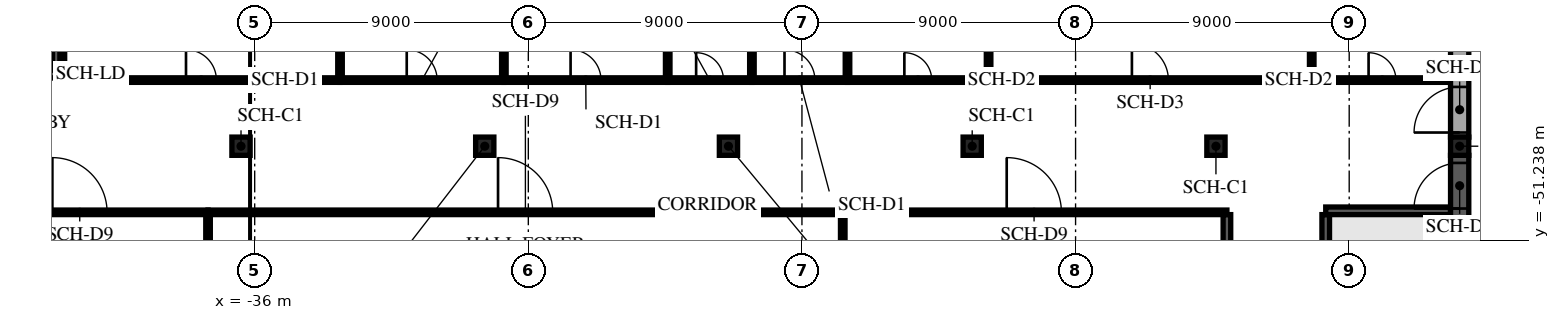
"""IFC4 building model, lengths in metres.
Left out: names, types, materials, properties, quantities, classifications, styles, units other than length and angle.
Written with IfcOpenShell. Run it as: python <this file> out.ifc"""

import sys

from ifc_helpers import new_model, si_unit, direction, frame, frame_2d, origin, origin_2d, place, context, subcontext, project, spatial, rectangle, extrude, element, fill, save


model = new_model("IFC4")
c1 = context("Model", 3, precision=1e-05, world=origin(), true_north=direction((0.0, 1.0)))
c2 = subcontext(c1, "Body", "Model", "MODEL_VIEW")
j1 = project(units=[si_unit("LENGTHUNIT", "METRE"), si_unit("PLANEANGLEUNIT", "RADIAN")], contexts=[c1])
p1 = place(None, origin())
s1 = spatial("IfcSite", under=j1, at=p1, CompositionType="ELEMENT")
p2 = place(p1, origin())
s2 = spatial("IfcBuilding", under=s1, at=p2, CompositionType="ELEMENT")
p3 = place(p2, origin())
s3 = spatial("IfcBuildingStorey", under=s2, at=p3, CompositionType="ELEMENT", Elevation=0.0)
p4 = place(p3, frame((-42.525, -45.9, -1.5), z_axis=(0.0, 0.0, 1.0), x_axis=(0.0, 1.0, 0.0)))
e1 = element("IfcWall", 1, at=p4, inside=s3, PredefinedType="SHEAR", context=c2, shape_type="SweptSolid", body=[
    extrude(rectangle(XDim=3.6, YDim=0.25, at=frame_2d((1.8, 0.0))), origin(), (0.0, 0.0, 1.0), 6.0),
])
p5 = place(p3, frame((-45.9, -45.775, -1.5), z_axis=(0.0, 0.0, 1.0), x_axis=(1.0, 0.0, 0.0)))
e2 = element("IfcWall", 2, at=p5, inside=s3, PredefinedType="SHEAR", context=c2, shape_type="SweptSolid", body=[
    extrude(rectangle(XDim=3.5, YDim=0.25, at=frame_2d((1.75, 0.0))), origin(), (0.0, 0.0, 1.0), 6.0),
])
p6 = place(p5, frame((1.2, 0.0, 1.5)))
e3 = element("IfcOpeningElement", 3, at=p6, cuts=e2, PredefinedType="OPENING", context=c2, shape_type="SweptSolid", body=[
    extrude(rectangle(XDim=1.1, YDim=2.1, at=frame_2d((0.55, 1.05))), frame((0.0, 0.135, 0.0), z_axis=(0.0, -1.0, 0.0), x_axis=(1.0, 0.0, 0.0)), (0.0, 0.0, 1.0), 0.27),
])
for number, where, z_axis, x_axis in (
    (4, (-36.45, -48.15, -0.2), (0.0, 0.0, 1.0), (1.0, 0.0, 0.0)),
    (5, (-28.433, -48.15, -0.2), (0.0, 0.0, 1.0), (1.0, 0.0, 0.0)),
    (6, (-20.417, -48.15, -0.2), (0.0, 0.0, 1.0), (1.0, 0.0, 0.0)),
    (7, (-12.4, -48.15, -0.2), (0.0, 0.0, 1.0), (1.0, 0.0, 0.0)),
    (8, (-4.383, -48.15, -0.2), (0.0, 0.0, 1.0), (1.0, 0.0, 0.0)),
    (9, (3.633, -48.15, -0.2), (0.0, 0.0, 1.0), (1.0, 0.0, 0.0)),
):
    element("IfcColumn", number, at=place(p3, frame(where, z_axis=z_axis, x_axis=x_axis)), inside=s3, PredefinedType="COLUMN", context=c2, shape_type="SweptSolid", body=[
        extrude(rectangle(XDim=0.6, YDim=0.6, at=origin_2d()), origin(), (0.0, 0.0, 1.0), 4.7),
    ])
for number, where, z_axis, x_axis in (
    (10, (-37.534, -59.55, 0.0), (0.0, 0.0, 1.0), (0.0, 1.0, 0.0)),
    (11, (-16.658, -59.55, 0.0), (0.0, 0.0, 1.0), (0.0, 1.0, 0.0)),
):
    element("IfcWall", number, at=place(p3, frame(where, z_axis=z_axis, x_axis=x_axis)), inside=s3, PredefinedType="PARTITIONING", context=c2, shape_type="SweptSolid", body=[
        extrude(rectangle(XDim=9.15, YDim=0.15, at=frame_2d((4.575, 0.0))), origin(), (0.0, 0.0, 1.0), 4.1),
    ])
p7 = place(p3, frame((-4.022, -59.55, 0.0), z_axis=(0.0, 0.0, 1.0), x_axis=(0.0, 1.0, 0.0)))
e12 = element("IfcWall", 12, at=p7, inside=s3, PredefinedType="SHEAR", context=c2, shape_type="SweptSolid", body=[
    extrude(rectangle(XDim=9.15, YDim=0.25, at=frame_2d((4.575, 0.0))), origin(), (0.0, 0.0, 1.0), 4.1),
])
p8 = place(p3, frame((-0.772, -59.55, 0.0), z_axis=(0.0, 0.0, 1.0), x_axis=(0.0, 1.0, 0.0)))
e13 = element("IfcWall", 13, at=p8, inside=s3, PredefinedType="SHEAR", context=c2, shape_type="SweptSolid", body=[
    extrude(rectangle(XDim=9.15, YDim=0.25, at=frame_2d((4.575, 0.0))), origin(), (0.0, 0.0, 1.0), 4.1),
])
p9 = place(p8, frame((0.35, 0.0, 0.0)))
e14 = element("IfcOpeningElement", 14, at=p9, cuts=e13, PredefinedType="OPENING", context=c2, shape_type="SweptSolid", body=[
    extrude(rectangle(XDim=1.2, YDim=2.1, at=frame_2d((0.6, 1.05))), frame((0.0, 0.135, 0.0), z_axis=(0.0, -1.0, 0.0), x_axis=(1.0, 0.0, 0.0)), (0.0, 0.0, 1.0), 0.27),
])
p10 = place(p3, frame((-45.9, -50.325, 0.0), z_axis=(0.0, 0.0, 1.0), x_axis=(1.0, 0.0, 0.0)))
e15 = element("IfcWall", 15, at=p10, inside=s3, PredefinedType="PARTITIONING", context=c2, shape_type="SweptSolid", body=[
    extrude(rectangle(XDim=8.365, YDim=0.15, at=frame_2d((4.183, 0.0))), origin(), (0.0, 0.0, 1.0), 4.1),
])
p11 = place(p10, frame((3.245, 0.0, 0.0)))
e16 = element("IfcOpeningElement", 16, at=p11, cuts=e15, PredefinedType="OPENING", context=c2, shape_type="SweptSolid", body=[
    extrude(rectangle(XDim=1.8, YDim=2.4, at=frame_2d((0.9, 1.2))), frame((0.0, 0.085, 0.0), z_axis=(0.0, -1.0, 0.0), x_axis=(1.0, 0.0, 0.0)), (0.0, 0.0, 1.0), 0.17),
])
p12 = place(p3, frame((-37.534, -50.325, 0.0), z_axis=(0.0, 0.0, 1.0), x_axis=(1.0, 0.0, 0.0)))
e17 = element("IfcWall", 17, at=p12, inside=s3, PredefinedType="PARTITIONING", context=c2, shape_type="SweptSolid", body=[
    extrude(rectangle(XDim=20.876, YDim=0.15, at=frame_2d((10.438, 0.0))), origin(), (0.0, 0.0, 1.0), 4.1),
])
p13 = place(p12, frame((9.538, 0.0, 0.0)))
e18 = element("IfcOpeningElement", 18, at=p13, cuts=e17, PredefinedType="OPENING", context=c2, shape_type="SweptSolid", body=[
    extrude(rectangle(XDim=1.8, YDim=2.4, at=frame_2d((0.9, 1.2))), frame((0.0, 0.085, 0.0), z_axis=(0.0, -1.0, 0.0), x_axis=(1.0, 0.0, 0.0)), (0.0, 0.0, 1.0), 0.17),
])
p14 = place(p3, frame((-16.658, -50.325, 0.0), z_axis=(0.0, 0.0, 1.0), x_axis=(1.0, 0.0, 0.0)))
e19 = element("IfcWall", 19, at=p14, inside=s3, PredefinedType="PARTITIONING", context=c2, shape_type="SweptSolid", body=[
    extrude(rectangle(XDim=12.636, YDim=0.15, at=frame_2d((6.318, 0.0))), origin(), (0.0, 0.0, 1.0), 4.1),
])
p15 = place(p14, frame((5.393, 0.0, 0.0)))
e20 = element("IfcOpeningElement", 20, at=p15, cuts=e19, PredefinedType="OPENING", context=c2, shape_type="SweptSolid", body=[
    extrude(rectangle(XDim=1.8, YDim=2.4, at=frame_2d((0.9, 1.2))), frame((0.0, 0.085, 0.0), z_axis=(0.0, -1.0, 0.0), x_axis=(1.0, 0.0, 0.0)), (0.0, 0.0, 1.0), 0.17),
])
p16 = place(p3, frame((-0.772, -50.275, 0.0), z_axis=(0.0, 0.0, 1.0), x_axis=(1.0, 0.0, 0.0)))
e21 = element("IfcWall", 21, at=p16, inside=s3, PredefinedType="SHEAR", context=c2, shape_type="SweptSolid", body=[
    extrude(rectangle(XDim=4.105, YDim=0.25, at=frame_2d((2.052, 0.0))), origin(), (0.0, 0.0, 1.0), 4.1),
])
for number, where, z_axis, x_axis in (
    (22, (-33.194, -45.9, 0.0), (0.0, 0.0, 1.0), (0.0, 1.0, 0.0)),
    (23, (-27.804, -45.9, 0.0), (0.0, 0.0, 1.0), (0.0, 1.0, 0.0)),
    (24, (-22.415, -45.9, 0.0), (0.0, 0.0, 1.0), (0.0, 1.0, 0.0)),
    (25, (-19.646, -45.9, 0.0), (0.0, 0.0, 1.0), (0.0, 1.0, 0.0)),
    (26, (-16.502, -45.9, 0.0), (0.0, 0.0, 1.0), (0.0, 1.0, 0.0)),
    (27, (-11.861, -45.9, 0.0), (0.0, 0.0, 1.0), (0.0, 1.0, 0.0)),
    (28, (-1.233, -45.9, 0.0), (0.0, 0.0, 1.0), (0.0, 1.0, 0.0)),
):
    element("IfcWall", number, at=place(p3, frame(where, z_axis=z_axis, x_axis=x_axis)), inside=s3, PredefinedType="PARTITIONING", context=c2, shape_type="SweptSolid", body=[
        extrude(rectangle(XDim=9.15, YDim=0.15, at=frame_2d((4.575, 0.0))), origin(), (0.0, 0.0, 1.0), 4.1),
    ])
p17 = place(p3, frame((-42.25, -45.975, 0.0), z_axis=(0.0, 0.0, 1.0), x_axis=(1.0, 0.0, 0.0)))
e29 = element("IfcWall", 29, at=p17, inside=s3, PredefinedType="PARTITIONING", context=c2, shape_type="SweptSolid", body=[
    extrude(rectangle(XDim=9.056, YDim=0.15, at=frame_2d((4.528, 0.0))), origin(), (0.0, 0.0, 1.0), 4.1),
])
p18 = place(p17, frame((3.991, 0.0, 0.0)))
e30 = element("IfcOpeningElement", 30, at=p18, cuts=e29, PredefinedType="OPENING", context=c2, shape_type="SweptSolid", body=[
    extrude(rectangle(XDim=1.0, YDim=2.1, at=frame_2d((0.5, 1.05))), frame((0.0, 0.085, 0.0), z_axis=(0.0, -1.0, 0.0), x_axis=(1.0, 0.0, 0.0)), (0.0, 0.0, 1.0), 0.17),
])
p19 = place(p3, frame((-33.194, -45.975, 0.0), z_axis=(0.0, 0.0, 1.0), x_axis=(1.0, 0.0, 0.0)))
e31 = element("IfcWall", 31, at=p19, inside=s3, PredefinedType="PARTITIONING", context=c2, shape_type="SweptSolid", body=[
    extrude(rectangle(XDim=5.389, YDim=0.15, at=frame_2d((2.695, 0.0))), origin(), (0.0, 0.0, 1.0), 4.1),
])
p20 = place(p19, frame((2.195, 0.0, 0.0)))
e32 = element("IfcOpeningElement", 32, at=p20, cuts=e31, PredefinedType="OPENING", context=c2, shape_type="SweptSolid", body=[
    extrude(rectangle(XDim=1.0, YDim=2.1, at=frame_2d((0.5, 1.05))), frame((0.0, 0.085, 0.0), z_axis=(0.0, -1.0, 0.0), x_axis=(1.0, 0.0, 0.0)), (0.0, 0.0, 1.0), 0.17),
])
p21 = place(p3, frame((-27.804, -45.975, 0.0), z_axis=(0.0, 0.0, 1.0), x_axis=(1.0, 0.0, 0.0)))
e33 = element("IfcWall", 33, at=p21, inside=s3, PredefinedType="PARTITIONING", context=c2, shape_type="SweptSolid", body=[
    extrude(rectangle(XDim=5.389, YDim=0.15, at=frame_2d((2.695, 0.0))), origin(), (0.0, 0.0, 1.0), 4.1),
])
p22 = place(p21, frame((2.195, 0.0, 0.0)))
e34 = element("IfcOpeningElement", 34, at=p22, cuts=e33, PredefinedType="OPENING", context=c2, shape_type="SweptSolid", body=[
    extrude(rectangle(XDim=1.0, YDim=2.1, at=frame_2d((0.5, 1.05))), frame((0.0, 0.085, 0.0), z_axis=(0.0, -1.0, 0.0), x_axis=(1.0, 0.0, 0.0)), (0.0, 0.0, 1.0), 0.17),
])
p23 = place(p3, frame((-22.415, -45.975, 0.0), z_axis=(0.0, 0.0, 1.0), x_axis=(1.0, 0.0, 0.0)))
e35 = element("IfcWall", 35, at=p23, inside=s3, PredefinedType="PARTITIONING", context=c2, shape_type="SweptSolid", body=[
    extrude(rectangle(XDim=2.77, YDim=0.15, at=frame_2d((1.385, 0.0))), origin(), (0.0, 0.0, 1.0), 4.1),
])
p24 = place(p23, frame((0.935, 0.0, 0.0)))
e36 = element("IfcOpeningElement", 36, at=p24, cuts=e35, PredefinedType="OPENING", context=c2, shape_type="SweptSolid", body=[
    extrude(rectangle(XDim=0.9, YDim=2.1, at=frame_2d((0.45, 1.05))), frame((0.0, 0.085, 0.0), z_axis=(0.0, -1.0, 0.0), x_axis=(1.0, 0.0, 0.0)), (0.0, 0.0, 1.0), 0.17),
])
p25 = place(p3, frame((-19.646, -45.975, 0.0), z_axis=(0.0, 0.0, 1.0), x_axis=(1.0, 0.0, 0.0)))
e37 = element("IfcWall", 37, at=p25, inside=s3, PredefinedType="PARTITIONING", context=c2, shape_type="SweptSolid", body=[
    extrude(rectangle(XDim=3.144, YDim=0.15, at=frame_2d((1.572, 0.0))), origin(), (0.0, 0.0, 1.0), 4.1),
])
p26 = place(p25, frame((1.072, 0.0, 0.0)))
e38 = element("IfcOpeningElement", 38, at=p26, cuts=e37, PredefinedType="OPENING", context=c2, shape_type="SweptSolid", body=[
    extrude(rectangle(XDim=1.0, YDim=2.1, at=frame_2d((0.5, 1.05))), frame((0.0, 0.085, 0.0), z_axis=(0.0, -1.0, 0.0), x_axis=(1.0, 0.0, 0.0)), (0.0, 0.0, 1.0), 0.17),
])
p27 = place(p3, frame((-16.502, -45.975, 0.0), z_axis=(0.0, 0.0, 1.0), x_axis=(1.0, 0.0, 0.0)))
e39 = element("IfcWall", 39, at=p27, inside=s3, PredefinedType="PARTITIONING", context=c2, shape_type="SweptSolid", body=[
    extrude(rectangle(XDim=4.641, YDim=0.15, at=frame_2d((2.32, 0.0))), origin(), (0.0, 0.0, 1.0), 4.1),
])
p28 = place(p27, frame((1.87, 0.0, 0.0)))
e40 = element("IfcOpeningElement", 40, at=p28, cuts=e39, PredefinedType="OPENING", context=c2, shape_type="SweptSolid", body=[
    extrude(rectangle(XDim=0.9, YDim=2.1, at=frame_2d((0.45, 1.05))), frame((0.0, 0.085, 0.0), z_axis=(0.0, -1.0, 0.0), x_axis=(1.0, 0.0, 0.0)), (0.0, 0.0, 1.0), 0.17),
])
p29 = place(p3, frame((-11.861, -45.975, 0.0), z_axis=(0.0, 0.0, 1.0), x_axis=(1.0, 0.0, 0.0)))
e41 = element("IfcWall", 41, at=p29, inside=s3, PredefinedType="PARTITIONING", context=c2, shape_type="SweptSolid", body=[
    extrude(rectangle(XDim=10.628, YDim=0.15, at=frame_2d((5.314, 0.0))), origin(), (0.0, 0.0, 1.0), 4.1),
])
p30 = place(p29, frame((4.714, 0.0, 0.0)))
e42 = element("IfcOpeningElement", 42, at=p30, cuts=e41, PredefinedType="OPENING", context=c2, shape_type="SweptSolid", body=[
    extrude(rectangle(XDim=1.2, YDim=2.1, at=frame_2d((0.6, 1.05))), frame((0.0, 0.085, 0.0), z_axis=(0.0, -1.0, 0.0), x_axis=(1.0, 0.0, 0.0)), (0.0, 0.0, 1.0), 0.17),
])
p31 = place(p3, frame((-1.233, -45.975, 0.0), z_axis=(0.0, 0.0, 1.0), x_axis=(1.0, 0.0, 0.0)))
e43 = element("IfcWall", 43, at=p31, inside=s3, PredefinedType="PARTITIONING", context=c2, shape_type="SweptSolid", body=[
    extrude(rectangle(XDim=4.566, YDim=0.15, at=frame_2d((2.283, 0.0))), origin(), (0.0, 0.0, 1.0), 4.1),
])
p32 = place(p31, frame((1.87, 0.0, 0.0)))
e44 = element("IfcOpeningElement", 44, at=p32, cuts=e43, PredefinedType="OPENING", context=c2, shape_type="SweptSolid", body=[
    extrude(rectangle(XDim=0.9, YDim=2.1, at=frame_2d((0.45, 1.05))), frame((0.0, 0.085, 0.0), z_axis=(0.0, -1.0, 0.0), x_axis=(1.0, 0.0, 0.0)), (0.0, 0.0, 1.0), 0.17),
])
p33 = place(p3, frame((-42.325, -45.9, 0.0), z_axis=(0.0, 0.0, 1.0), x_axis=(0.0, 1.0, 0.0)))
e45 = element("IfcWall", 45, at=p33, inside=s3, PredefinedType="PARTITIONING", context=c2, shape_type="SweptSolid", body=[
    extrude(rectangle(XDim=9.15, YDim=0.15, at=frame_2d((4.575, 0.0))), origin(), (0.0, 0.0, 1.0), 4.1),
])
p34 = place(p3, frame((3.633, -59.55, -0.2), z_axis=(0.0, 0.0, 1.0), x_axis=(0.0, 1.0, 0.0)))
e46 = element("IfcWall", 46, at=p34, inside=s3, PredefinedType="SOLIDWALL", context=c2, shape_type="SweptSolid", body=[
    extrude(rectangle(XDim=11.1, YDim=0.6, at=frame_2d((5.55, 0.0))), origin(), (0.0, 0.0, 1.0), 4.7),
])
p35 = place(p34, frame((9.35, 0.0, 0.2)))
e47 = element("IfcOpeningElement", 47, at=p35, cuts=e46, PredefinedType="OPENING", context=c2, shape_type="SweptSolid", body=[
    extrude(rectangle(XDim=1.5, YDim=2.4, at=frame_2d((0.75, 1.2))), frame((0.0, 0.31, 0.0), z_axis=(0.0, -1.0, 0.0), x_axis=(1.0, 0.0, 0.0)), (0.0, 0.0, 1.0), 0.62),
])
p36 = place(p3, frame((3.633, -47.85, -0.2), z_axis=(0.0, 0.0, 1.0), x_axis=(0.0, 1.0, 0.0)))
e48 = element("IfcWall", 48, at=p36, inside=s3, PredefinedType="SOLIDWALL", context=c2, shape_type="SweptSolid", body=[
    extrude(rectangle(XDim=11.1, YDim=0.6, at=frame_2d((5.55, 0.0))), origin(), (0.0, 0.0, 1.0), 4.7),
])
p37 = place(p36, frame((0.15, 0.0, 0.2)))
e49 = element("IfcOpeningElement", 49, at=p37, cuts=e48, PredefinedType="OPENING", context=c2, shape_type="SweptSolid", body=[
    extrude(rectangle(XDim=1.5, YDim=2.4, at=frame_2d((0.75, 1.2))), frame((0.0, 0.31, 0.0), z_axis=(0.0, -1.0, 0.0), x_axis=(1.0, 0.0, 0.0)), (0.0, 0.0, 1.0), 0.62),
])
p38 = place(p11, origin())
e50 = element("IfcDoor", 50, at=p38, inside=s3, OperationType="DOUBLE_DOOR_SINGLE_SWING", PredefinedType="DOOR", context=c2, shape_type="SweptSolid", body=[
    extrude(rectangle(XDim=1.8, YDim=2.4, at=frame_2d((0.9, 1.2))), frame((0.0, 0.025, 0.0), z_axis=(0.0, -1.0, 0.0), x_axis=(1.0, 0.0, 0.0)), (0.0, 0.0, 1.0), 0.05),
])
fill(e16, e50)
p39 = place(p13, origin())
e51 = element("IfcDoor", 51, at=p39, inside=s3, OperationType="DOUBLE_DOOR_SINGLE_SWING", PredefinedType="DOOR", context=c2, shape_type="SweptSolid", body=[
    extrude(rectangle(XDim=1.8, YDim=2.4, at=frame_2d((0.9, 1.2))), frame((0.0, 0.025, 0.0), z_axis=(0.0, -1.0, 0.0), x_axis=(1.0, 0.0, 0.0)), (0.0, 0.0, 1.0), 0.05),
])
fill(e18, e51)
p40 = place(p15, origin())
e52 = element("IfcDoor", 52, at=p40, inside=s3, OperationType="DOUBLE_DOOR_SINGLE_SWING", PredefinedType="DOOR", context=c2, shape_type="SweptSolid", body=[
    extrude(rectangle(XDim=1.8, YDim=2.4, at=frame_2d((0.9, 1.2))), frame((0.0, 0.025, 0.0), z_axis=(0.0, -1.0, 0.0), x_axis=(1.0, 0.0, 0.0)), (0.0, 0.0, 1.0), 0.05),
])
fill(e20, e52)
p41 = place(p18, origin())
e53 = element("IfcDoor", 53, at=p41, inside=s3, OperationType="SINGLE_SWING_LEFT", PredefinedType="DOOR", context=c2, shape_type="SweptSolid", body=[
    extrude(rectangle(XDim=1.0, YDim=2.1, at=frame_2d((0.5, 1.05))), frame((0.0, 0.025, 0.0), z_axis=(0.0, -1.0, 0.0), x_axis=(1.0, 0.0, 0.0)), (0.0, 0.0, 1.0), 0.05),
])
fill(e30, e53)
p42 = place(p20, origin())
e54 = element("IfcDoor", 54, at=p42, inside=s3, OperationType="SINGLE_SWING_RIGHT", PredefinedType="DOOR", context=c2, shape_type="SweptSolid", body=[
    extrude(rectangle(XDim=1.0, YDim=2.1, at=frame_2d((0.5, 1.05))), frame((0.0, 0.025, 0.0), z_axis=(0.0, -1.0, 0.0), x_axis=(1.0, 0.0, 0.0)), (0.0, 0.0, 1.0), 0.05),
])
fill(e32, e54)
p43 = place(p22, origin())
e55 = element("IfcDoor", 55, at=p43, inside=s3, OperationType="SINGLE_SWING_LEFT", PredefinedType="DOOR", context=c2, shape_type="SweptSolid", body=[
    extrude(rectangle(XDim=1.0, YDim=2.1, at=frame_2d((0.5, 1.05))), frame((0.0, 0.025, 0.0), z_axis=(0.0, -1.0, 0.0), x_axis=(1.0, 0.0, 0.0)), (0.0, 0.0, 1.0), 0.05),
])
fill(e34, e55)
p44 = place(p24, origin())
e56 = element("IfcDoor", 56, at=p44, inside=s3, OperationType="SINGLE_SWING_RIGHT", PredefinedType="DOOR", context=c2, shape_type="SweptSolid", body=[
    extrude(rectangle(XDim=0.9, YDim=2.1, at=frame_2d((0.45, 1.05))), frame((0.0, 0.025, 0.0), z_axis=(0.0, -1.0, 0.0), x_axis=(1.0, 0.0, 0.0)), (0.0, 0.0, 1.0), 0.05),
])
fill(e36, e56)
p45 = place(p26, origin())
e57 = element("IfcDoor", 57, at=p45, inside=s3, OperationType="SINGLE_SWING_LEFT", PredefinedType="DOOR", context=c2, shape_type="SweptSolid", body=[
    extrude(rectangle(XDim=1.0, YDim=2.1, at=frame_2d((0.5, 1.05))), frame((0.0, 0.025, 0.0), z_axis=(0.0, -1.0, 0.0), x_axis=(1.0, 0.0, 0.0)), (0.0, 0.0, 1.0), 0.05),
])
fill(e38, e57)
p46 = place(p28, origin())
e58 = element("IfcDoor", 58, at=p46, inside=s3, OperationType="SINGLE_SWING_RIGHT", PredefinedType="DOOR", context=c2, shape_type="SweptSolid", body=[
    extrude(rectangle(XDim=0.9, YDim=2.1, at=frame_2d((0.45, 1.05))), frame((0.0, 0.025, 0.0), z_axis=(0.0, -1.0, 0.0), x_axis=(1.0, 0.0, 0.0)), (0.0, 0.0, 1.0), 0.05),
])
fill(e40, e58)
p47 = place(p30, origin())
e59 = element("IfcDoor", 59, at=p47, inside=s3, OperationType="SINGLE_SWING_LEFT", PredefinedType="DOOR", context=c2, shape_type="SweptSolid", body=[
    extrude(rectangle(XDim=1.2, YDim=2.1, at=frame_2d((0.6, 1.05))), frame((0.0, 0.025, 0.0), z_axis=(0.0, -1.0, 0.0), x_axis=(1.0, 0.0, 0.0)), (0.0, 0.0, 1.0), 0.05),
])
fill(e42, e59)
p48 = place(p32, origin())
e60 = element("IfcDoor", 60, at=p48, inside=s3, OperationType="SINGLE_SWING_RIGHT", PredefinedType="DOOR", context=c2, shape_type="SweptSolid", body=[
    extrude(rectangle(XDim=0.9, YDim=2.1, at=frame_2d((0.45, 1.05))), frame((0.0, 0.025, 0.0), z_axis=(0.0, -1.0, 0.0), x_axis=(1.0, 0.0, 0.0)), (0.0, 0.0, 1.0), 0.05),
])
fill(e44, e60)
p49 = place(p35, origin())
e61 = element("IfcDoor", 61, at=p49, inside=s3, OperationType="DOUBLE_DOOR_SINGLE_SWING", PredefinedType="DOOR", context=c2, shape_type="SweptSolid", body=[
    extrude(rectangle(XDim=1.5, YDim=2.4, at=frame_2d((0.75, 1.2))), frame((0.0, 0.025, 0.0), z_axis=(0.0, -1.0, 0.0), x_axis=(1.0, 0.0, 0.0)), (0.0, 0.0, 1.0), 0.05),
])
fill(e47, e61)
p50 = place(p37, origin())
e62 = element("IfcDoor", 62, at=p50, inside=s3, OperationType="DOUBLE_DOOR_SINGLE_SWING", PredefinedType="DOOR", context=c2, shape_type="SweptSolid", body=[
    extrude(rectangle(XDim=1.5, YDim=2.4, at=frame_2d((0.75, 1.2))), frame((0.0, 0.025, 0.0), z_axis=(0.0, -1.0, 0.0), x_axis=(1.0, 0.0, 0.0)), (0.0, 0.0, 1.0), 0.05),
])
fill(e49, e62)
save(model, sys.argv[1])
